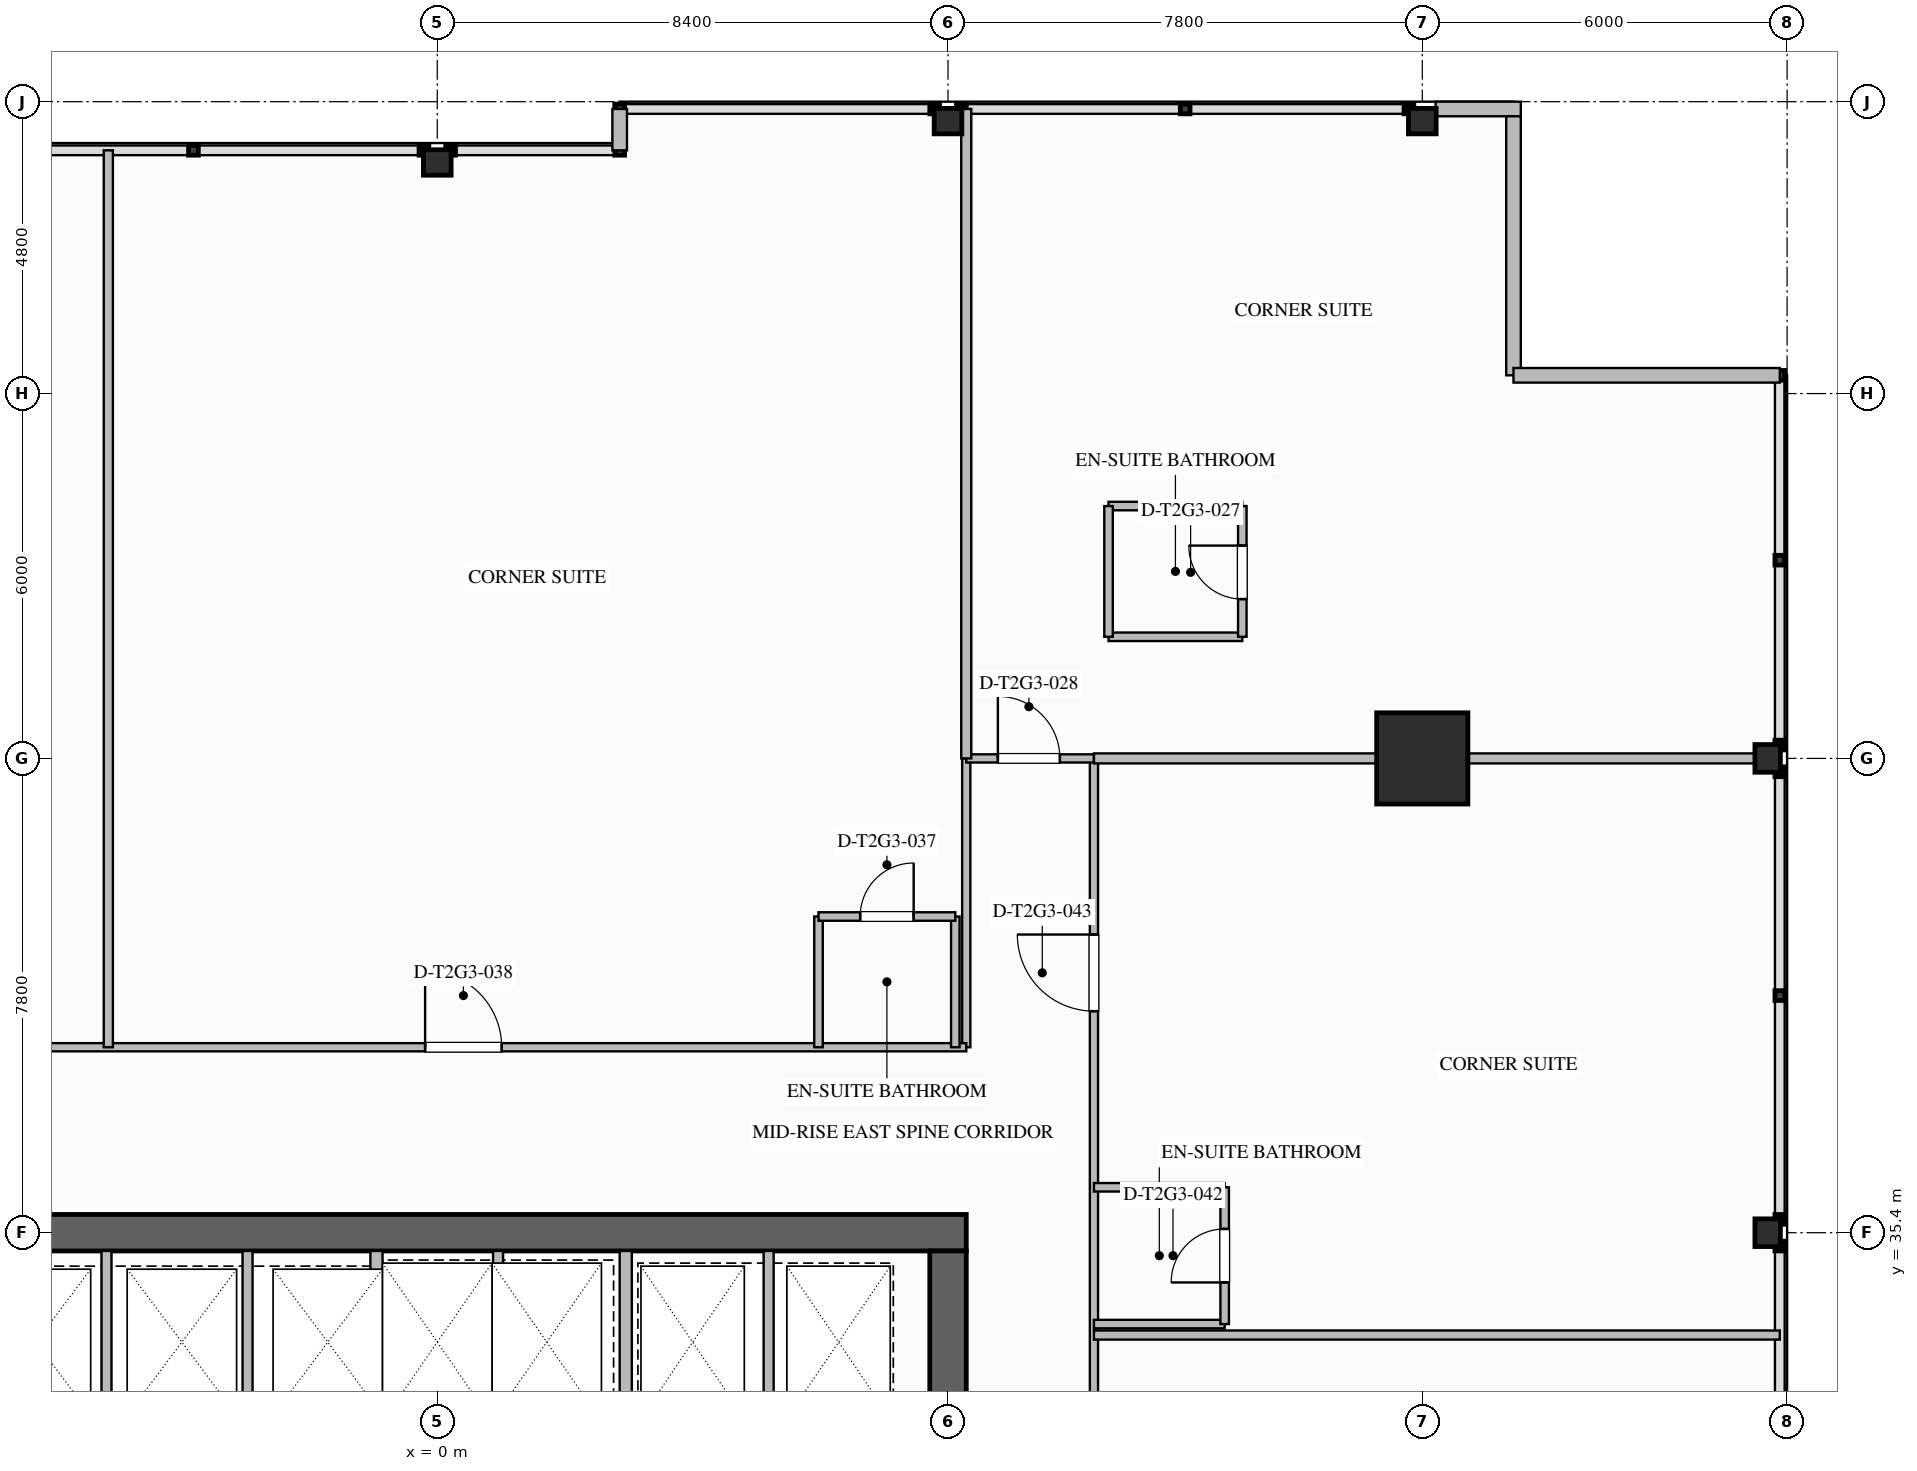
"""IFC4 building model, lengths in metres.
Left out: names, types, materials, properties, quantities, classifications, styles, units other than length and angle.
Written with IfcOpenShell. Run it as: python <this file> out.ifc"""

import sys

from ifc_helpers import new_model, si_unit, direction, frame, frame_2d, origin, origin_2d, place, context, subcontext, project, spatial, rectangle, i_section, extrude, element, fill, save


model = new_model("IFC4")
c1 = context("Model", 3, precision=1e-05, world=origin(), true_north=direction((0.0, 1.0)))
c2 = subcontext(c1, "Body", "Model", "MODEL_VIEW")
j1 = project(units=[si_unit("LENGTHUNIT", "METRE"), si_unit("PLANEANGLEUNIT", "RADIAN")], contexts=[c1])
p1 = place(None, origin())
s1 = spatial("IfcSite", under=j1, at=p1, CompositionType="ELEMENT")
p2 = place(p1, origin())
s2 = spatial("IfcBuilding", under=s1, at=p2, CompositionType="ELEMENT")
p3 = place(p2, frame((0.0, 0.0, 112.8)))
s3 = spatial("IfcBuildingStorey", under=s2, at=p3, CompositionType="ELEMENT", Elevation=112.8)
p4 = place(p3, frame((-8.7, 35.4, 0.0), z_axis=(0.0, 0.0, 1.0), x_axis=(1.0, 0.0, 0.0)))
e1 = element("IfcWall", 1, at=p4, inside=s3, PredefinedType="SHEAR", context=c2, shape_type="SweptSolid", body=[
    extrude(rectangle(XDim=17.4, YDim=0.6, at=frame_2d((8.7, 0.0))), origin(), (0.0, 0.0, 1.0), 3.5),
])
p5 = place(p3, frame((8.4, 35.1, 0.0), z_axis=(0.0, 0.0, 1.0), x_axis=(0.0, -1.0, 0.0)))
e2 = element("IfcWall", 2, at=p5, inside=s3, PredefinedType="SHEAR", context=c2, shape_type="SweptSolid", body=[
    extrude(rectangle(XDim=16.2, YDim=0.6, at=frame_2d((8.1, 0.0))), origin(), (0.0, 0.0, 1.0), 3.5),
])
p6 = place(p5, frame((3.08, 0.0, 0.0)))
e3 = element("IfcOpeningElement", 3, at=p6, cuts=e2, PredefinedType="OPENING", context=c2, shape_type="SweptSolid", body=[
    extrude(rectangle(XDim=1.12, YDim=2.1, at=frame_2d((0.56, 1.05))), frame((0.0, 0.31, 0.0), z_axis=(0.0, -1.0, 0.0), x_axis=(1.0, 0.0, 0.0)), (0.0, 0.0, 1.0), 0.62),
])
p7 = place(p5, frame((10.62, 0.0, 0.0)))
e4 = element("IfcOpeningElement", 4, at=p7, cuts=e2, PredefinedType="OPENING", context=c2, shape_type="SweptSolid", body=[
    extrude(rectangle(XDim=1.08, YDim=2.04, at=frame_2d((0.54, 1.02))), frame((0.0, 0.31, 0.0), z_axis=(0.0, -1.0, 0.0), x_axis=(1.0, 0.0, 0.0)), (0.0, 0.0, 1.0), 0.62),
])
p8 = place(p3, frame((16.2, 43.2, 0.0), z_axis=(0.0, 0.0, 1.0), x_axis=(1.0, 0.0, 0.0)))
e5 = element("IfcColumn", 5, at=p8, inside=s3, PredefinedType="COLUMN", context=c2, shape_type="SweptSolid", body=[
    extrude(rectangle(XDim=1.5, YDim=1.5, at=origin_2d()), origin(), (0.0, 0.0, 1.0), 3.5),
])
for number, where, z_axis, x_axis in (
    (6, (21.88, 35.4, 0.0), (0.0, 0.0, 1.0), (1.0, 0.0, 0.0)),
    (7, (21.88, 43.2, 0.0), (0.0, 0.0, 1.0), (1.0, 0.0, 0.0)),
    (8, (0.0, 53.0, 0.0), (0.0, 0.0, 1.0), (0.0, 1.0, 0.0)),
    (9, (8.4, 53.68, 0.0), (0.0, 0.0, 1.0), (0.0, 1.0, 0.0)),
    (10, (16.2, 53.68, 0.0), (0.0, 0.0, 1.0), (0.0, 1.0, 0.0)),
):
    element("IfcColumn", number, at=place(p3, frame(where, z_axis=z_axis, x_axis=x_axis)), inside=s3, PredefinedType="COLUMN", context=c2, shape_type="SweptSolid", body=[
        extrude(i_section(OverallWidth=0.418, OverallDepth=0.455, WebThickness=0.042, FlangeThickness=0.068, FilletRadius=0.03, at=origin_2d()), origin(), (0.0, 0.0, 1.0), 3.497),
    ])
p9 = place(p3, frame((16.42, 53.88, 0.0), z_axis=(0.0, 0.0, 1.0), x_axis=(1.0, 0.0, 0.0)))
e11 = element("IfcWall", 11, at=p9, inside=s3, PredefinedType="STANDARD", context=c2, shape_type="SweptSolid", body=[
    extrude(rectangle(XDim=1.4, YDim=0.24, at=frame_2d((0.7, 0.0))), origin(), (0.0, 0.0, 1.0), 3.24),
])
p10 = place(p3, frame((17.7, 53.76, 0.0), z_axis=(0.0, 0.0, 1.0), x_axis=(0.0, -1.0, 0.0)))
e12 = element("IfcWall", 12, at=p10, inside=s3, PredefinedType="STANDARD", context=c2, shape_type="SweptSolid", body=[
    extrude(rectangle(XDim=4.26, YDim=0.24, at=frame_2d((2.13, 0.0))), origin(), (0.0, 0.0, 1.0), 3.24),
])
p11 = place(p3, frame((17.7, 49.5, 0.0), z_axis=(0.0, 0.0, 1.0), x_axis=(1.0, 0.0, 0.0)))
e13 = element("IfcWall", 13, at=p11, inside=s3, PredefinedType="STANDARD", context=c2, shape_type="SweptSolid", body=[
    extrude(rectangle(XDim=4.38, YDim=0.24, at=frame_2d((2.19, 0.0))), origin(), (0.0, 0.0, 1.0), 3.24),
])
p12 = place(p3, frame((3.0, 53.2, 0.0), z_axis=(0.0, 0.0, 1.0), x_axis=(0.0, 1.0, 0.0)))
e14 = element("IfcWall", 14, at=p12, inside=s3, PredefinedType="STANDARD", context=c2, shape_type="SweptSolid", body=[
    extrude(rectangle(XDim=0.68, YDim=0.24, at=frame_2d((0.34, 0.0))), origin(), (0.0, 0.0, 1.0), 3.24),
])
p13 = place(p3, frame((3.1, 32.22, 0.0), z_axis=(0.0, 0.0, 1.0), x_axis=(0.0, 1.0, 0.0)))
e15 = element("IfcWall", 15, at=p13, inside=s3, PredefinedType="SOLIDWALL", context=c2, shape_type="SweptSolid", body=[
    extrude(rectangle(XDim=2.88, YDim=0.2, at=frame_2d((1.44, 0.0))), origin(), (0.0, 0.0, 1.0), 3.24),
])
p14 = place(p3, frame((5.45, 32.22, 0.0), z_axis=(0.0, 0.0, 1.0), x_axis=(0.0, 1.0, 0.0)))
e16 = element("IfcWall", 16, at=p14, inside=s3, PredefinedType="PARTITIONING", context=c2, shape_type="SweptSolid", body=[
    extrude(rectangle(XDim=2.88, YDim=0.165, at=frame_2d((1.44, 0.0))), origin(), (0.0, 0.0, 1.0), 3.24),
])
p15 = place(p3, frame((-1.0, 32.18, 0.0), z_axis=(0.0, 0.0, 1.0), x_axis=(0.0, 1.0, 0.0)))
e17 = element("IfcWall", 17, at=p15, inside=s3, PredefinedType="SOLIDWALL", context=c2, shape_type="SweptSolid", body=[
    extrude(rectangle(XDim=2.92, YDim=0.2, at=frame_2d((1.46, 0.0))), origin(), (0.0, 0.0, 1.0), 3.24),
])
p16 = place(p3, frame((1.0, 32.18, 0.0), z_axis=(0.0, 0.0, 1.0), x_axis=(0.0, 1.0, 0.0)))
e18 = element("IfcWall", 18, at=p16, inside=s3, PredefinedType="PARTITIONING", context=c2, shape_type="SweptSolid", body=[
    extrude(rectangle(XDim=2.92, YDim=0.165, at=frame_2d((1.46, 0.0))), origin(), (0.0, 0.0, 1.0), 3.24),
])
for number, where, z_axis, x_axis in (
    (19, (-5.44, 32.22, 0.0), (0.0, 0.0, 1.0), (0.0, 1.0, 0.0)),
    (20, (-3.12, 32.22, 0.0), (0.0, 0.0, 1.0), (0.0, 1.0, 0.0)),
):
    element("IfcWall", number, at=place(p3, frame(where, z_axis=z_axis, x_axis=x_axis)), inside=s3, PredefinedType="PARTITIONING", context=c2, shape_type="SweptSolid", body=[
        extrude(rectangle(XDim=2.88, YDim=0.165, at=frame_2d((1.44, 0.0))), origin(), (0.0, 0.0, 1.0), 3.24),
    ])
p17 = place(p3, frame((8.7, 38.45, 0.0), z_axis=(0.0, 0.0, 1.0), x_axis=(0.0, 1.0, 0.0)))
e21 = element("IfcWall", 21, at=p17, inside=s3, PredefinedType="PARTITIONING", context=c2, shape_type="SweptSolid", body=[
    extrude(rectangle(XDim=4.75, YDim=0.135, at=frame_2d((2.375, 0.0))), origin(), (0.0, 0.0, 1.0), 3.24),
])
p18 = place(p3, frame((-16.2, 38.45, 0.0), z_axis=(0.0, 0.0, 1.0), x_axis=(1.0, 0.0, 0.0)))
e22 = element("IfcWall", 22, at=p18, inside=s3, PredefinedType="PARTITIONING", context=c2, shape_type="SweptSolid", body=[
    extrude(rectangle(XDim=24.9, YDim=0.135, at=frame_2d((12.45, 0.0))), origin(), (0.0, 0.0, 1.0), 3.24),
])
p19 = place(p18, frame((5.98, 0.0, 0.0)))
e23 = element("IfcOpeningElement", 23, at=p19, cuts=e22, PredefinedType="OPENING", context=c2, shape_type="SweptSolid", body=[
    extrude(rectangle(XDim=1.26, YDim=2.2, at=frame_2d((0.63, 1.1))), frame((0.0, 0.077, 0.0), z_axis=(0.0, -1.0, 0.0), x_axis=(1.0, 0.0, 0.0)), (0.0, 0.0, 1.0), 0.155),
])
p20 = place(p18, frame((16.0, 0.0, 0.0)))
e24 = element("IfcOpeningElement", 24, at=p20, cuts=e22, PredefinedType="OPENING", context=c2, shape_type="SweptSolid", body=[
    extrude(rectangle(XDim=1.26, YDim=2.2, at=frame_2d((0.63, 1.1))), frame((0.0, 0.077, 0.0), z_axis=(0.0, -1.0, 0.0), x_axis=(1.0, 0.0, 0.0)), (0.0, 0.0, 1.0), 0.155),
])
p21 = place(p3, frame((10.8, 10.8, 0.0), z_axis=(0.0, 0.0, 1.0), x_axis=(0.0, 1.0, 0.0)))
e25 = element("IfcWall", 25, at=p21, inside=s3, PredefinedType="PARTITIONING", context=c2, shape_type="SweptSolid", body=[
    extrude(rectangle(XDim=32.4, YDim=0.135, at=frame_2d((16.2, 0.0))), origin(), (0.0, 0.0, 1.0), 3.24),
])
p22 = place(p21, frame((5.722, 0.0, 0.0)))
e26 = element("IfcOpeningElement", 26, at=p22, cuts=e25, PredefinedType="OPENING", context=c2, shape_type="SweptSolid", body=[
    extrude(rectangle(XDim=1.26, YDim=2.2, at=frame_2d((0.63, 1.1))), frame((0.0, 0.077, 0.0), z_axis=(0.0, -1.0, 0.0), x_axis=(1.0, 0.0, 0.0)), (0.0, 0.0, 1.0), 0.155),
])
p23 = place(p21, frame((16.085, 0.0, 0.0)))
e27 = element("IfcOpeningElement", 27, at=p23, cuts=e25, PredefinedType="OPENING", context=c2, shape_type="SweptSolid", body=[
    extrude(rectangle(XDim=1.02, YDim=2.15, at=frame_2d((0.51, 1.075))), frame((0.0, 0.077, 0.0), z_axis=(0.0, -1.0, 0.0), x_axis=(1.0, 0.0, 0.0)), (0.0, 0.0, 1.0), 0.155),
])
p24 = place(p21, frame((28.244, 0.0, 0.0)))
e28 = element("IfcOpeningElement", 28, at=p24, cuts=e25, PredefinedType="OPENING", context=c2, shape_type="SweptSolid", body=[
    extrude(rectangle(XDim=1.26, YDim=2.2, at=frame_2d((0.63, 1.1))), frame((0.0, 0.077, 0.0), z_axis=(0.0, -1.0, 0.0), x_axis=(1.0, 0.0, 0.0)), (0.0, 0.0, 1.0), 0.155),
])
p25 = place(p3, frame((8.7, 43.2, 0.0), z_axis=(0.0, 0.0, 1.0), x_axis=(1.0, 0.0, 0.0)))
e29 = element("IfcWall", 29, at=p25, inside=s3, PredefinedType="PARTITIONING", context=c2, shape_type="SweptSolid", body=[
    extrude(rectangle(XDim=2.1, YDim=0.135, at=frame_2d((1.05, 0.0))), origin(), (0.0, 0.0, 1.0), 2.452),
])
p26 = place(p25, frame((0.52, 0.0, 0.0)))
e30 = element("IfcOpeningElement", 30, at=p26, cuts=e29, PredefinedType="OPENING", context=c2, shape_type="SweptSolid", body=[
    extrude(rectangle(XDim=1.02, YDim=2.15, at=frame_2d((0.51, 1.075))), frame((0.0, 0.077, 0.0), z_axis=(0.0, -1.0, 0.0), x_axis=(1.0, 0.0, 0.0)), (0.0, 0.0, 1.0), 0.155),
])
p27 = place(p3, frame((8.7, 43.2, 0.0), z_axis=(0.0, 0.0, 1.0), x_axis=(0.0, 1.0, 0.0)))
e31 = element("IfcWall", 31, at=p27, inside=s3, PredefinedType="PARTITIONING", context=c2, shape_type="SweptSolid", body=[
    extrude(rectangle(XDim=10.68, YDim=0.165, at=frame_2d((5.34, 0.0))), origin(), (0.0, 0.0, 1.0), 2.452),
])
p28 = place(p3, frame((10.8, 43.2, 0.0), z_axis=(0.0, 0.0, 1.0), x_axis=(1.0, 0.0, 0.0)))
e32 = element("IfcWall", 32, at=p28, inside=s3, PredefinedType="PARTITIONING", context=c2, shape_type="SweptSolid", body=[
    extrude(rectangle(XDim=11.28, YDim=0.165, at=frame_2d((5.64, 0.0))), origin(), (0.0, 0.0, 1.0), 2.452),
])
for number, where, z_axis, x_axis in (
    (33, (11.04, 45.2, 0.0), (0.0, 0.0, 1.0), (1.0, 0.0, 0.0)),
    (34, (11.04, 47.35, 0.0), (0.0, 0.0, 1.0), (1.0, 0.0, 0.0)),
):
    element("IfcWall", number, at=place(p3, frame(where, z_axis=z_axis, x_axis=x_axis)), inside=s3, PredefinedType="PLUMBINGWALL", context=c2, shape_type="SweptSolid", body=[
        extrude(rectangle(XDim=2.2, YDim=0.14, at=frame_2d((1.1, 0.0))), origin(), (0.0, 0.0, 1.0), 3.24),
    ])
p29 = place(p3, frame((11.04, 45.2, 0.0), z_axis=(0.0, 0.0, 1.0), x_axis=(0.0, 1.0, 0.0)))
e35 = element("IfcWall", 35, at=p29, inside=s3, PredefinedType="PLUMBINGWALL", context=c2, shape_type="SweptSolid", body=[
    extrude(rectangle(XDim=2.15, YDim=0.14, at=frame_2d((1.075, 0.0))), origin(), (0.0, 0.0, 1.0), 3.24),
])
p30 = place(p3, frame((13.24, 45.2, 0.0), z_axis=(0.0, 0.0, 1.0), x_axis=(0.0, 1.0, 0.0)))
e36 = element("IfcWall", 36, at=p30, inside=s3, PredefinedType="PLUMBINGWALL", context=c2, shape_type="SweptSolid", body=[
    extrude(rectangle(XDim=2.15, YDim=0.14, at=frame_2d((1.075, 0.0))), origin(), (0.0, 0.0, 1.0), 3.24),
])
p31 = place(p30, frame((0.62, 0.0, 0.0)))
e37 = element("IfcOpeningElement", 37, at=p31, cuts=e36, PredefinedType="OPENING", context=c2, shape_type="SweptSolid", body=[
    extrude(rectangle(XDim=0.88, YDim=2.1, at=frame_2d((0.44, 1.05))), frame((0.0, 0.08, 0.0), z_axis=(0.0, -1.0, 0.0), x_axis=(1.0, 0.0, 0.0)), (0.0, 0.0, 1.0), 0.16),
])
p32 = place(p3, frame((-5.41, 38.45, 0.0), z_axis=(0.0, 0.0, 1.0), x_axis=(0.0, 1.0, 0.0)))
e38 = element("IfcWall", 38, at=p32, inside=s3, PredefinedType="PARTITIONING", context=c2, shape_type="SweptSolid", body=[
    extrude(rectangle(XDim=14.75, YDim=0.15, at=frame_2d((7.375, 0.0))), origin(), (0.0, 0.0, 1.0), 3.24),
])
p33 = place(p3, frame((6.27, 38.45, 0.0), z_axis=(0.0, 0.0, 1.0), x_axis=(0.0, 1.0, 0.0)))
e39 = element("IfcWall", 39, at=p33, inside=s3, PredefinedType="PLUMBINGWALL", context=c2, shape_type="SweptSolid", body=[
    extrude(rectangle(XDim=2.15, YDim=0.14, at=frame_2d((1.075, 0.0))), origin(), (0.0, 0.0, 1.0), 3.24),
])
p34 = place(p3, frame((8.52, 38.45, 0.0), z_axis=(0.0, 0.0, 1.0), x_axis=(0.0, 1.0, 0.0)))
e40 = element("IfcWall", 40, at=p34, inside=s3, PredefinedType="PLUMBINGWALL", context=c2, shape_type="SweptSolid", body=[
    extrude(rectangle(XDim=2.15, YDim=0.14, at=frame_2d((1.075, 0.0))), origin(), (0.0, 0.0, 1.0), 2.617),
])
p35 = place(p3, frame((6.27, 40.6, 0.0), z_axis=(0.0, 0.0, 1.0), x_axis=(1.0, 0.0, 0.0)))
e41 = element("IfcWall", 41, at=p35, inside=s3, PredefinedType="PLUMBINGWALL", context=c2, shape_type="SweptSolid", body=[
    extrude(rectangle(XDim=2.25, YDim=0.14, at=frame_2d((1.125, 0.0))), origin(), (0.0, 0.0, 1.0), 3.24),
])
p36 = place(p35, frame((0.685, 0.0, 0.0)))
e42 = element("IfcOpeningElement", 42, at=p36, cuts=e41, PredefinedType="OPENING", context=c2, shape_type="SweptSolid", body=[
    extrude(rectangle(XDim=0.88, YDim=2.1, at=frame_2d((0.44, 1.05))), frame((0.0, 0.08, 0.0), z_axis=(0.0, -1.0, 0.0), x_axis=(1.0, 0.0, 0.0)), (0.0, 0.0, 1.0), 0.16),
])
p37 = place(p3, frame((10.8, 33.717, 0.0), z_axis=(0.0, 0.0, 1.0), x_axis=(1.0, 0.0, 0.0)))
e43 = element("IfcWall", 43, at=p37, inside=s3, PredefinedType="PARTITIONING", context=c2, shape_type="SweptSolid", body=[
    extrude(rectangle(XDim=11.28, YDim=0.15, at=frame_2d((5.64, 0.0))), origin(), (0.0, 0.0, 1.0), 3.24),
])
for number, where, z_axis, x_axis in (
    (44, (10.8, 33.897, 0.0), (0.0, 0.0, 1.0), (1.0, 0.0, 0.0)),
    (45, (10.8, 36.147, 0.0), (0.0, 0.0, 1.0), (1.0, 0.0, 0.0)),
):
    element("IfcWall", number, at=place(p3, frame(where, z_axis=z_axis, x_axis=x_axis)), inside=s3, PredefinedType="PLUMBINGWALL", context=c2, shape_type="SweptSolid", body=[
        extrude(rectangle(XDim=2.15, YDim=0.14, at=frame_2d((1.075, 0.0))), origin(), (0.0, 0.0, 1.0), 3.24),
    ])
p38 = place(p3, frame((12.95, 33.897, 0.0), z_axis=(0.0, 0.0, 1.0), x_axis=(0.0, 1.0, 0.0)))
e46 = element("IfcWall", 46, at=p38, inside=s3, PredefinedType="PLUMBINGWALL", context=c2, shape_type="SweptSolid", body=[
    extrude(rectangle(XDim=2.25, YDim=0.14, at=frame_2d((1.125, 0.0))), origin(), (0.0, 0.0, 1.0), 3.24),
])
p39 = place(p38, frame((0.685, 0.0, 0.0)))
e47 = element("IfcOpeningElement", 47, at=p39, cuts=e46, PredefinedType="OPENING", context=c2, shape_type="SweptSolid", body=[
    extrude(rectangle(XDim=0.88, YDim=2.1, at=frame_2d((0.44, 1.05))), frame((0.0, 0.08, 0.0), z_axis=(0.0, -1.0, 0.0), x_axis=(1.0, 0.0, 0.0)), (0.0, 0.0, 1.0), 0.16),
])
p40 = place(p31, origin())
e48 = element("IfcDoor", 48, at=p40, inside=s3, OperationType="SINGLE_SWING_RIGHT", PredefinedType="DOOR", context=c2, shape_type="SweptSolid", body=[
    extrude(rectangle(XDim=0.88, YDim=2.1, at=frame_2d((0.44, 1.05))), frame((0.0, 0.025, 0.0), z_axis=(0.0, -1.0, 0.0), x_axis=(1.0, 0.0, 0.0)), (0.0, 0.0, 1.0), 0.05),
])
fill(e37, e48)
p41 = place(p26, origin())
e49 = element("IfcDoor", 49, at=p41, inside=s3, OperationType="SINGLE_SWING_LEFT", PredefinedType="DOOR", context=c2, shape_type="SweptSolid", body=[
    extrude(rectangle(XDim=1.02, YDim=2.15, at=frame_2d((0.51, 1.075))), frame((0.0, 0.025, 0.0), z_axis=(0.0, -1.0, 0.0), x_axis=(1.0, 0.0, 0.0)), (0.0, 0.0, 1.0), 0.05),
])
fill(e30, e49)
p42 = place(p36, origin())
e50 = element("IfcDoor", 50, at=p42, inside=s3, OperationType="SINGLE_SWING_RIGHT", PredefinedType="DOOR", context=c2, shape_type="SweptSolid", body=[
    extrude(rectangle(XDim=0.88, YDim=2.1, at=frame_2d((0.44, 1.05))), frame((0.0, 0.025, 0.0), z_axis=(0.0, -1.0, 0.0), x_axis=(1.0, 0.0, 0.0)), (0.0, 0.0, 1.0), 0.05),
])
fill(e42, e50)
p43 = place(p20, origin())
e51 = element("IfcDoor", 51, at=p43, inside=s3, OperationType="SINGLE_SWING_LEFT", PredefinedType="DOOR", context=c2, shape_type="SweptSolid", body=[
    extrude(rectangle(XDim=1.26, YDim=2.2, at=frame_2d((0.63, 1.1))), frame((0.0, 0.025, 0.0), z_axis=(0.0, -1.0, 0.0), x_axis=(1.0, 0.0, 0.0)), (0.0, 0.0, 1.0), 0.05),
])
fill(e24, e51)
p44 = place(p39, origin())
e52 = element("IfcDoor", 52, at=p44, inside=s3, OperationType="SINGLE_SWING_LEFT", PredefinedType="DOOR", context=c2, shape_type="SweptSolid", body=[
    extrude(rectangle(XDim=0.88, YDim=2.1, at=frame_2d((0.44, 1.05))), frame((0.0, 0.025, 0.0), z_axis=(0.0, -1.0, 0.0), x_axis=(1.0, 0.0, 0.0)), (0.0, 0.0, 1.0), 0.05),
])
fill(e47, e52)
p45 = place(p24, origin())
e53 = element("IfcDoor", 53, at=p45, inside=s3, OperationType="SINGLE_SWING_RIGHT", PredefinedType="DOOR", context=c2, shape_type="SweptSolid", body=[
    extrude(rectangle(XDim=1.26, YDim=2.2, at=frame_2d((0.63, 1.1))), frame((0.0, 0.025, 0.0), z_axis=(0.0, -1.0, 0.0), x_axis=(1.0, 0.0, 0.0)), (0.0, 0.0, 1.0), 0.05),
])
fill(e28, e53)
save(model, sys.argv[1])
